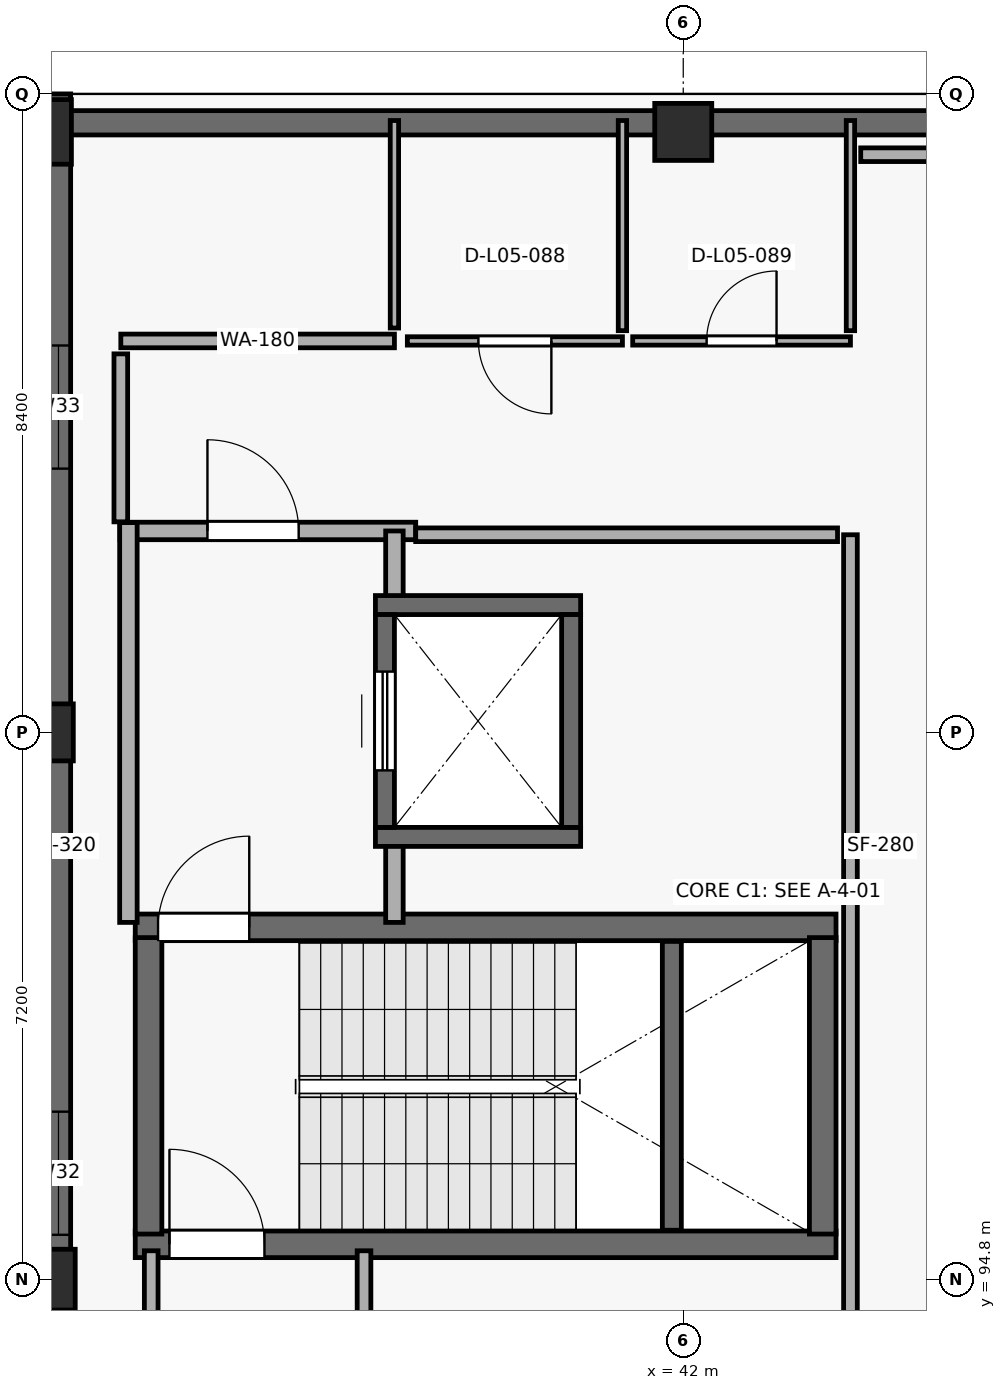
"""IFC4 building model, lengths in metres.
Left out: names, types, materials, properties, quantities, classifications, styles, units other than length and angle.
Written with IfcOpenShell. Run it as: python <this file> out.ifc"""

import sys

from ifc_helpers import new_model, si_unit, direction, frame, frame_2d, origin, origin_2d, place, context, subcontext, project, spatial, rectangle, extrude, element, fill, save


model = new_model("IFC4")
c1 = context("Model", 3, precision=1e-05, world=origin(), true_north=direction((0.0, 1.0)))
c2 = subcontext(c1, "Body", "Model", "MODEL_VIEW")
j1 = project(units=[si_unit("LENGTHUNIT", "METRE"), si_unit("PLANEANGLEUNIT", "RADIAN")], contexts=[c1])
p1 = place(None, origin())
s1 = spatial("IfcSite", under=j1, at=p1, CompositionType="ELEMENT")
p2 = place(p1, origin())
s2 = spatial("IfcBuilding", under=s1, at=p2, CompositionType="ELEMENT")
p3 = place(p2, frame((0.0, 0.0, 20.4)))
s3 = spatial("IfcBuildingStorey", under=s2, at=p3, CompositionType="ELEMENT", Elevation=20.4)
p4 = place(p3, frame((33.6, 94.8, 0.0), z_axis=(0.0, 0.0, 1.0), x_axis=(1.0, 0.0, 0.0)))
e1 = element("IfcColumn", 1, at=p4, inside=s3, PredefinedType="COLUMN", context=c2, shape_type="SweptSolid", body=[
    extrude(rectangle(XDim=0.8, YDim=0.8, at=origin_2d()), origin(), (0.0, 0.0, 1.0), 5.1),
])
p5 = place(p3, frame((33.6, 102.0, 0.0), z_axis=(0.0, 0.0, 1.0), x_axis=(1.0, 0.0, 0.0)))
e2 = element("IfcColumn", 2, at=p5, inside=s3, PredefinedType="COLUMN", context=c2, shape_type="SweptSolid", body=[
    extrude(rectangle(XDim=0.75, YDim=0.75, at=origin_2d()), origin(), (0.0, 0.0, 1.0), 5.1),
])
p6 = place(p3, frame((33.6, 109.9, 0.0), z_axis=(0.0, 0.0, 1.0), x_axis=(1.0, 0.0, 0.0)))
e3 = element("IfcColumn", 3, at=p6, inside=s3, PredefinedType="COLUMN", context=c2, shape_type="SweptSolid", body=[
    extrude(rectangle(XDim=0.7, YDim=0.85, at=origin_2d()), origin(), (0.0, 0.0, 1.0), 5.1),
])
p7 = place(p3, frame((42.0, 109.9, 0.0), z_axis=(0.0, 0.0, 1.0), x_axis=(1.0, 0.0, 0.0)))
e4 = element("IfcColumn", 4, at=p7, inside=s3, PredefinedType="COLUMN", context=c2, shape_type="SweptSolid", body=[
    extrude(rectangle(XDim=0.75, YDim=0.75, at=origin_2d()), origin(), (0.0, 0.0, 1.0), 5.1),
])
p8 = place(p3, frame((33.78, 90.6, 0.0), z_axis=(0.0, 0.0, 1.0), x_axis=(0.0, 1.0, 0.0)))
e5 = element("IfcWall", 5, at=p8, inside=s3, PredefinedType="SOLIDWALL", context=c2, shape_type="SweptSolid", body=[
    extrude(rectangle(XDim=19.8, YDim=0.32, at=frame_2d((9.9, 0.0))), origin(), (0.0, 0.0, 1.0), 4.84),
])
p9 = place(p8, frame((4.79, 0.0, 0.75)))
e6 = element("IfcOpeningElement", 6, at=p9, cuts=e5, PredefinedType="OPENING", context=c2, shape_type="SweptSolid", body=[
    extrude(rectangle(XDim=1.62, YDim=2.25, at=frame_2d((0.81, 1.125))), frame((0.0, 0.17, 0.0), z_axis=(0.0, -1.0, 0.0), x_axis=(1.0, 0.0, 0.0)), (0.0, 0.0, 1.0), 0.34),
])
p10 = place(p8, frame((14.87, 0.0, 0.75)))
e7 = element("IfcOpeningElement", 7, at=p10, cuts=e5, PredefinedType="OPENING", context=c2, shape_type="SweptSolid", body=[
    extrude(rectangle(XDim=1.62, YDim=2.65, at=frame_2d((0.81, 1.325))), frame((0.0, 0.17, 0.0), z_axis=(0.0, -1.0, 0.0), x_axis=(1.0, 0.0, 0.0)), (0.0, 0.0, 1.0), 0.34),
])
p11 = place(p3, frame((33.6, 110.02, 0.0), z_axis=(0.0, 0.0, 1.0), x_axis=(1.0, 0.0, 0.0)))
e8 = element("IfcWall", 8, at=p11, inside=s3, PredefinedType="SOLIDWALL", context=c2, shape_type="SweptSolid", body=[
    extrude(rectangle(XDim=33.6, YDim=0.32, at=frame_2d((16.8, 0.0))), origin(), (0.0, 0.0, 1.0), 4.84),
])
p12 = place(p3, frame((34.79, 95.265, 0.0), z_axis=(0.0, 0.0, 1.0), x_axis=(1.0, 0.0, 0.0)))
e9 = element("IfcWall", 9, at=p12, inside=s3, PredefinedType="SHEAR", context=c2, shape_type="SweptSolid", body=[
    extrude(rectangle(XDim=9.22, YDim=0.35, at=frame_2d((4.61, 0.0))), origin(), (0.0, 0.0, 1.0), 4.84),
])
p13 = place(p12, frame((0.45, 0.0, 0.0)))
e10 = element("IfcOpeningElement", 10, at=p13, cuts=e9, PredefinedType="OPENING", context=c2, shape_type="SweptSolid", body=[
    extrude(rectangle(XDim=1.25, YDim=2.2, at=frame_2d((0.625, 1.1))), frame((0.0, 0.185, 0.0), z_axis=(0.0, -1.0, 0.0), x_axis=(1.0, 0.0, 0.0)), (0.0, 0.0, 1.0), 0.37),
])
p14 = place(p3, frame((44.01, 99.435, 0.0), z_axis=(0.0, 0.0, 1.0), x_axis=(-1.0, 0.0, 0.0)))
e11 = element("IfcWall", 11, at=p14, inside=s3, PredefinedType="SHEAR", context=c2, shape_type="SweptSolid", body=[
    extrude(rectangle(XDim=9.22, YDim=0.35, at=frame_2d((4.61, 0.0))), origin(), (0.0, 0.0, 1.0), 4.84),
])
p15 = place(p14, frame((7.72, 0.0, 0.0)))
e12 = element("IfcOpeningElement", 12, at=p15, cuts=e11, PredefinedType="OPENING", context=c2, shape_type="SweptSolid", body=[
    extrude(rectangle(XDim=1.2, YDim=2.2, at=frame_2d((0.6, 1.1))), frame((0.0, 0.185, 0.0), z_axis=(0.0, -1.0, 0.0), x_axis=(1.0, 0.0, 0.0)), (0.0, 0.0, 1.0), 0.37),
])
for number, where, z_axis, x_axis in (
    (13, (34.965, 95.4, 0.0), (0.0, 0.0, 1.0), (0.0, 1.0, 0.0)),
    (14, (43.835, 99.3, 0.0), (0.0, 0.0, 1.0), (0.0, -1.0, 0.0)),
):
    element("IfcWall", number, at=place(p3, frame(where, z_axis=z_axis, x_axis=x_axis)), inside=s3, PredefinedType="SHEAR", context=c2, shape_type="SweptSolid", body=[
        extrude(rectangle(XDim=3.9, YDim=0.35, at=frame_2d((1.95, 0.0))), origin(), (0.0, 0.0, 1.0), 4.84),
    ])
p16 = place(p3, frame((41.85, 95.45, 0.0), z_axis=(0.0, 0.0, 1.0), x_axis=(0.0, 1.0, 0.0)))
e15 = element("IfcWall", 15, at=p16, inside=s3, PredefinedType="SHEAR", context=c2, shape_type="SweptSolid", body=[
    extrude(rectangle(XDim=3.8, YDim=0.25, at=frame_2d((1.9, 0.0))), origin(), (0.0, 0.0, 1.0), 2.37),
])
p17 = place(p3, frame((34.59, 104.65, 0.0), z_axis=(0.0, 0.0, 1.0), x_axis=(1.0, 0.0, 0.0)))
e16 = element("IfcWall", 16, at=p17, inside=s3, PredefinedType="PARTITIONING", context=c2, shape_type="SweptSolid", body=[
    extrude(rectangle(XDim=3.89, YDim=0.23, at=frame_2d((1.945, 0.0))), origin(), (0.0, 0.0, 1.0), 4.84),
])
p18 = place(p17, frame((1.15, 0.0, 0.0)))
e17 = element("IfcOpeningElement", 17, at=p18, cuts=e16, PredefinedType="OPENING", context=c2, shape_type="SweptSolid", body=[
    extrude(rectangle(XDim=1.2, YDim=2.2, at=frame_2d((0.6, 1.1))), frame((0.0, 0.125, 0.0), z_axis=(0.0, -1.0, 0.0), x_axis=(1.0, 0.0, 0.0)), (0.0, 0.0, 1.0), 0.25),
])
p19 = place(p3, frame((34.7, 99.5, 0.0), z_axis=(0.0, 0.0, 1.0), x_axis=(0.0, 1.0, 0.0)))
e18 = element("IfcWall", 18, at=p19, inside=s3, PredefinedType="PARTITIONING", context=c2, shape_type="SweptSolid", body=[
    extrude(rectangle(XDim=5.26, YDim=0.23, at=frame_2d((2.63, 0.0))), origin(), (0.0, 0.0, 1.0), 4.84),
])
p20 = place(p3, frame((38.2, 104.65, 0.0), z_axis=(0.0, 0.0, 1.0), x_axis=(0.0, -1.0, 0.0)))
e19 = element("IfcWall", 19, at=p20, inside=s3, PredefinedType="PARTITIONING", context=c2, shape_type="SweptSolid", body=[
    extrude(rectangle(XDim=1.1, YDim=0.23, at=frame_2d((0.55, 0.0))), origin(), (0.0, 0.0, 1.0), 4.84),
])
p21 = place(p3, frame((38.2, 100.75, 0.0), z_axis=(0.0, 0.0, 1.0), x_axis=(0.0, -1.0, 0.0)))
e20 = element("IfcWall", 20, at=p21, inside=s3, PredefinedType="PARTITIONING", context=c2, shape_type="SweptSolid", body=[
    extrude(rectangle(XDim=1.25, YDim=0.23, at=frame_2d((0.625, 0.0))), origin(), (0.0, 0.0, 1.0), 4.84),
])
for number, where, z_axis, x_axis in (
    (21, (37.95, 100.625, 0.0), (0.0, 0.0, 1.0), (1.0, 0.0, 0.0)),
    (22, (40.65, 103.675, 0.0), (0.0, 0.0, 1.0), (-1.0, 0.0, 0.0)),
):
    element("IfcWall", number, at=place(p3, frame(where, z_axis=z_axis, x_axis=x_axis)), inside=s3, PredefinedType="SHEAR", context=c2, shape_type="SweptSolid", body=[
        extrude(rectangle(XDim=2.7, YDim=0.25, at=frame_2d((1.35, 0.0))), origin(), (0.0, 0.0, 1.0), 4.84),
    ])
p22 = place(p3, frame((38.075, 100.75, 0.0), z_axis=(0.0, 0.0, 1.0), x_axis=(0.0, 1.0, 0.0)))
e23 = element("IfcWall", 23, at=p22, inside=s3, PredefinedType="SHEAR", context=c2, shape_type="SweptSolid", body=[
    extrude(rectangle(XDim=2.8, YDim=0.25, at=frame_2d((1.4, 0.0))), origin(), (0.0, 0.0, 1.0), 4.84),
])
p23 = place(p22, frame((0.75, 0.0, 0.0)))
e24 = element("IfcOpeningElement", 24, at=p23, cuts=e23, PredefinedType="OPENING", context=c2, shape_type="SweptSolid", body=[
    extrude(rectangle(XDim=1.3, YDim=2.25, at=frame_2d((0.65, 1.125))), frame((0.0, 0.135, 0.0), z_axis=(0.0, -1.0, 0.0), x_axis=(1.0, 0.0, 0.0)), (0.0, 0.0, 1.0), 0.27),
])
p24 = place(p3, frame((40.525, 103.55, 0.0), z_axis=(0.0, 0.0, 1.0), x_axis=(0.0, -1.0, 0.0)))
e25 = element("IfcWall", 25, at=p24, inside=s3, PredefinedType="SHEAR", context=c2, shape_type="SweptSolid", body=[
    extrude(rectangle(XDim=2.8, YDim=0.25, at=frame_2d((1.4, 0.0))), origin(), (0.0, 0.0, 1.0), 4.84),
])
p25 = place(p3, frame((44.2, 104.6, 0.0), z_axis=(0.0, 0.0, 1.0), x_axis=(0.0, -1.0, 0.0)))
e26 = element("IfcWall", 26, at=p25, inside=s3, PredefinedType="PARTITIONING", context=c2, shape_type="SweptSolid", body=[
    extrude(rectangle(XDim=10.75, YDim=0.18, at=frame_2d((5.375, 0.0))), origin(), (0.0, 0.0, 1.0), 4.84),
])
p26 = place(p3, frame((38.48, 104.6, 0.0), z_axis=(0.0, 0.0, 1.0), x_axis=(1.0, 0.0, 0.0)))
e27 = element("IfcWall", 27, at=p26, inside=s3, PredefinedType="PARTITIONING", context=c2, shape_type="SweptSolid", body=[
    extrude(rectangle(XDim=5.55, YDim=0.18, at=frame_2d((2.775, 0.0))), origin(), (0.0, 0.0, 1.0), 4.84),
])
p27 = place(p3, frame((38.2, 107.15, 0.0), z_axis=(0.0, 0.0, 1.0), x_axis=(-1.0, 0.0, 0.0)))
e28 = element("IfcWall", 28, at=p27, inside=s3, PredefinedType="PARTITIONING", context=c2, shape_type="SweptSolid", body=[
    extrude(rectangle(XDim=3.6, YDim=0.18, at=frame_2d((1.8, 0.0))), origin(), (0.0, 0.0, 1.0), 4.84),
])
p28 = place(p3, frame((41.2, 107.15, 0.0), z_axis=(0.0, 0.0, 1.0), x_axis=(-1.0, 0.0, 0.0)))
e29 = element("IfcWall", 29, at=p28, inside=s3, PredefinedType="PARTITIONING", context=c2, shape_type="SweptSolid", body=[
    extrude(rectangle(XDim=2.83, YDim=0.11, at=frame_2d((1.415, 0.0))), origin(), (0.0, 0.0, 1.0), 4.84),
])
p29 = place(p28, frame((0.935, 0.0, 0.0)))
e30 = element("IfcOpeningElement", 30, at=p29, cuts=e29, PredefinedType="OPENING", context=c2, shape_type="SweptSolid", body=[
    extrude(rectangle(XDim=0.96, YDim=2.14, at=frame_2d((0.48, 1.07))), frame((0.0, 0.065, 0.0), z_axis=(0.0, -1.0, 0.0), x_axis=(1.0, 0.0, 0.0)), (0.0, 0.0, 1.0), 0.13),
])
p30 = place(p3, frame((44.2, 107.15, 0.0), z_axis=(0.0, 0.0, 1.0), x_axis=(-1.0, 0.0, 0.0)))
e31 = element("IfcWall", 31, at=p30, inside=s3, PredefinedType="PARTITIONING", context=c2, shape_type="SweptSolid", body=[
    extrude(rectangle(XDim=2.865, YDim=0.11, at=frame_2d((1.433, 0.0))), origin(), (0.0, 0.0, 1.0), 4.84),
])
p31 = place(p30, frame((0.972, 0.0, 0.0)))
e32 = element("IfcOpeningElement", 32, at=p31, cuts=e31, PredefinedType="OPENING", context=c2, shape_type="SweptSolid", body=[
    extrude(rectangle(XDim=0.92, YDim=2.12, at=frame_2d((0.46, 1.06))), frame((0.0, 0.065, 0.0), z_axis=(0.0, -1.0, 0.0), x_axis=(1.0, 0.0, 0.0)), (0.0, 0.0, 1.0), 0.13),
])
p32 = place(p3, frame((41.2, 110.05, 0.0), z_axis=(0.0, 0.0, 1.0), x_axis=(0.0, -1.0, 0.0)))
e33 = element("IfcWall", 33, at=p32, inside=s3, PredefinedType="PARTITIONING", context=c2, shape_type="SweptSolid", body=[
    extrude(rectangle(XDim=2.765, YDim=0.11, at=frame_2d((1.383, 0.0))), origin(), (0.0, 0.0, 1.0), 4.84),
])
p33 = place(p3, frame((38.2, 107.32, 0.0), z_axis=(0.0, 0.0, 1.0), x_axis=(0.0, 1.0, 0.0)))
e34 = element("IfcWall", 34, at=p33, inside=s3, PredefinedType="PARTITIONING", context=c2, shape_type="SweptSolid", body=[
    extrude(rectangle(XDim=2.73, YDim=0.11, at=frame_2d((1.365, 0.0))), origin(), (0.0, 0.0, 1.0), 4.84),
])
p34 = place(p3, frame((44.2, 110.05, 0.0), z_axis=(0.0, 0.0, 1.0), x_axis=(0.0, -1.0, 0.0)))
e35 = element("IfcWall", 35, at=p34, inside=s3, PredefinedType="PARTITIONING", context=c2, shape_type="SweptSolid", body=[
    extrude(rectangle(XDim=2.765, YDim=0.11, at=frame_2d((1.383, 0.0))), origin(), (0.0, 0.0, 1.0), 4.84),
])
p35 = place(p3, frame((34.6, 106.98, 0.0), z_axis=(0.0, 0.0, 1.0), x_axis=(0.0, -1.0, 0.0)))
e36 = element("IfcWall", 36, at=p35, inside=s3, PredefinedType="PARTITIONING", context=c2, shape_type="SweptSolid", body=[
    extrude(rectangle(XDim=2.21, YDim=0.18, at=frame_2d((1.105, 0.0))), origin(), (0.0, 0.0, 1.0), 4.84),
])
p36 = place(p3, frame((46.23, 109.6, 0.0), z_axis=(0.0, 0.0, 1.0), x_axis=(-1.0, 0.0, 0.0)))
e37 = element("IfcWall", 37, at=p36, inside=s3, PredefinedType="PARTITIONING", context=c2, shape_type="SweptSolid", body=[
    extrude(rectangle(XDim=1.895, YDim=0.18, at=frame_2d((0.948, 0.0))), origin(), (0.0, 0.0, 1.0), 3.9),
])
p37 = place(p3, frame((37.8, 94.02, 0.0), z_axis=(0.0, 0.0, 1.0), x_axis=(0.0, 1.0, 0.0)))
e38 = element("IfcWall", 38, at=p37, inside=s3, PredefinedType="PARTITIONING", context=c2, shape_type="SweptSolid", body=[
    extrude(rectangle(XDim=1.16, YDim=0.18, at=frame_2d((0.58, 0.0))), origin(), (0.0, 0.0, 1.0), 4.84),
])
p38 = place(p3, frame((35.0, 95.18, 0.0), z_axis=(0.0, 0.0, 1.0), x_axis=(0.0, -1.0, 0.0)))
e39 = element("IfcWall", 39, at=p38, inside=s3, PredefinedType="PARTITIONING", context=c2, shape_type="SweptSolid", body=[
    extrude(rectangle(XDim=1.33, YDim=0.18, at=frame_2d((0.665, 0.0))), origin(), (0.0, 0.0, 1.0), 4.84),
])
p39 = place(p9, origin())
e40 = element("IfcWindow", 40, at=p39, inside=s3, PartitioningType="SINGLE_PANEL", PredefinedType="WINDOW", context=c2, shape_type="SweptSolid", body=[
    extrude(rectangle(XDim=1.62, YDim=2.25, at=frame_2d((0.81, 1.125))), frame((0.0, 0.03, 0.0), z_axis=(0.0, -1.0, 0.0), x_axis=(1.0, 0.0, 0.0)), (0.0, 0.0, 1.0), 0.06),
])
fill(e6, e40)
p40 = place(p10, origin())
e41 = element("IfcWindow", 41, at=p40, inside=s3, PartitioningType="SINGLE_PANEL", PredefinedType="WINDOW", context=c2, shape_type="SweptSolid", body=[
    extrude(rectangle(XDim=1.62, YDim=2.65, at=frame_2d((0.81, 1.325))), frame((0.0, 0.03, 0.0), z_axis=(0.0, -1.0, 0.0), x_axis=(1.0, 0.0, 0.0)), (0.0, 0.0, 1.0), 0.06),
])
fill(e7, e41)
p41 = place(p13, origin())
e42 = element("IfcDoor", 42, at=p41, inside=s3, OperationType="SINGLE_SWING_LEFT", PredefinedType="DOOR", context=c2, shape_type="SweptSolid", body=[
    extrude(rectangle(XDim=1.25, YDim=2.2, at=frame_2d((0.625, 1.1))), frame((0.0, 0.025, 0.0), z_axis=(0.0, -1.0, 0.0), x_axis=(1.0, 0.0, 0.0)), (0.0, 0.0, 1.0), 0.05),
])
fill(e10, e42)
p42 = place(p15, origin())
e43 = element("IfcDoor", 43, at=p42, inside=s3, OperationType="SINGLE_SWING_RIGHT", PredefinedType="DOOR", context=c2, shape_type="SweptSolid", body=[
    extrude(rectangle(XDim=1.2, YDim=2.2, at=frame_2d((0.6, 1.1))), frame((0.0, 0.025, 0.0), z_axis=(0.0, -1.0, 0.0), x_axis=(1.0, 0.0, 0.0)), (0.0, 0.0, 1.0), 0.05),
])
fill(e12, e43)
p43 = place(p18, origin())
e44 = element("IfcDoor", 44, at=p43, inside=s3, OperationType="SINGLE_SWING_LEFT", PredefinedType="DOOR", context=c2, shape_type="SweptSolid", body=[
    extrude(rectangle(XDim=1.2, YDim=2.2, at=frame_2d((0.6, 1.1))), frame((0.0, 0.025, 0.0), z_axis=(0.0, -1.0, 0.0), x_axis=(1.0, 0.0, 0.0)), (0.0, 0.0, 1.0), 0.05),
])
fill(e17, e44)
p44 = place(p23, origin())
e45 = element("IfcDoor", 45, at=p44, inside=s3, OperationType="SLIDING_TO_RIGHT", PredefinedType="DOOR", context=c2, shape_type="SweptSolid", body=[
    extrude(rectangle(XDim=1.3, YDim=2.25, at=frame_2d((0.65, 1.125))), frame((0.0, 0.025, 0.0), z_axis=(0.0, -1.0, 0.0), x_axis=(1.0, 0.0, 0.0)), (0.0, 0.0, 1.0), 0.05),
])
fill(e24, e45)
p45 = place(p29, origin())
e46 = element("IfcDoor", 46, at=p45, inside=s3, OperationType="SINGLE_SWING_LEFT", PredefinedType="DOOR", context=c2, shape_type="SweptSolid", body=[
    extrude(rectangle(XDim=0.96, YDim=2.14, at=frame_2d((0.48, 1.07))), frame((0.0, 0.025, 0.0), z_axis=(0.0, -1.0, 0.0), x_axis=(1.0, 0.0, 0.0)), (0.0, 0.0, 1.0), 0.05),
])
fill(e30, e46)
p46 = place(p31, origin())
e47 = element("IfcDoor", 47, at=p46, inside=s3, OperationType="SINGLE_SWING_RIGHT", PredefinedType="DOOR", context=c2, shape_type="SweptSolid", body=[
    extrude(rectangle(XDim=0.92, YDim=2.12, at=frame_2d((0.46, 1.06))), frame((0.0, 0.025, 0.0), z_axis=(0.0, -1.0, 0.0), x_axis=(1.0, 0.0, 0.0)), (0.0, 0.0, 1.0), 0.05),
])
fill(e32, e47)
save(model, sys.argv[1])
